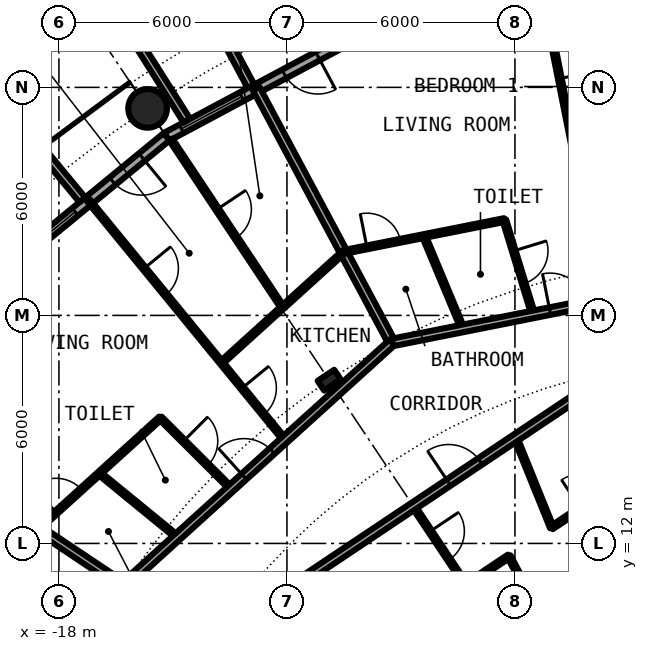
"""IFC4 building model, lengths in metres.
Left out: names, types, materials, properties, quantities, classifications, styles, units other than length and angle.
Written with IfcOpenShell. Run it as: python <this file> out.ifc"""

import sys

from ifc_helpers import new_model, si_unit, direction, frame, frame_2d, origin, origin_2d, place, context, subcontext, project, spatial, rectangle, hollow_circle, i_section, extrude, element, fill, save


model = new_model("IFC4")
c1 = context("Model", 3, precision=1e-05, world=origin(), true_north=direction((0.0, 1.0)))
c2 = subcontext(c1, "Body", "Model", "MODEL_VIEW")
j1 = project(units=[si_unit("LENGTHUNIT", "METRE"), si_unit("PLANEANGLEUNIT", "RADIAN")], contexts=[c1])
p1 = place(None, origin())
s1 = spatial("IfcSite", under=j1, at=p1, CompositionType="ELEMENT")
p2 = place(p1, origin())
s2 = spatial("IfcBuilding", under=s1, at=p2, CompositionType="ELEMENT")
p3 = place(p2, frame((0.0, 0.0, 63.6)))
s3 = spatial("IfcBuildingStorey", under=s2, at=p3, CompositionType="ELEMENT", Elevation=63.6)
p4 = place(p3, frame((-15.667, 23.448, 0.0), z_axis=(0.0, 0.0, 1.0), x_axis=(1.0, 0.0, 0.0)))
e1 = element("IfcColumn", 1, at=p4, inside=s3, PredefinedType="COLUMN", context=c2, shape_type="SweptSolid", body=[
    extrude(hollow_circle(Radius=0.508, WallThickness=0.04, at=origin_2d()), origin(), (0.0, 0.0, 1.0), 3.05),
])
p5 = place(p3, frame((-10.889, 16.297, 0.0), z_axis=(0.0, 0.0, 1.0), x_axis=(-0.55557023302, 0.831469612303, 0.0)))
e2 = element("IfcColumn", 2, at=p5, inside=s3, PredefinedType="COLUMN", context=c2, shape_type="SweptSolid", body=[
    extrude(i_section(OverallWidth=0.306, OverallDepth=0.524, WebThickness=0.021, FlangeThickness=0.04, FilletRadius=0.027, at=origin_2d()), origin(), (0.0, 0.0, 1.0), 3.05),
])
p6 = place(p3, frame((-10.447, 25.222, 0.0), z_axis=(0.0, 0.0, 1.0), x_axis=(-0.881915646801, -0.471407246368, 0.0)))
e3 = element("IfcWall", 3, at=p6, inside=s3, PredefinedType="SOLIDWALL", context=c2, shape_type="SweptSolid", body=[
    extrude(rectangle(XDim=5.352, YDim=0.25, at=frame_2d((2.676, 0.0))), origin(), (0.0, 0.0, 1.0), 2.7),
])
p7 = place(p6, frame((0.841, 0.0, 0.0)))
e4 = element("IfcOpeningElement", 4, at=p7, cuts=e3, PredefinedType="OPENING", context=c2, shape_type="SweptSolid", body=[
    extrude(rectangle(XDim=1.0, YDim=2.2, at=frame_2d((0.5, 1.1))), frame((0.0, 0.135, 0.0), z_axis=(0.0, -1.0, 0.0), x_axis=(1.0, 0.0, 0.0)), (0.0, 0.0, 1.0), 0.27),
])
p8 = place(p6, frame((3.111, 0.0, 0.3)))
e5 = element("IfcOpeningElement", 5, at=p8, cuts=e3, PredefinedType="OPENING", context=c2, shape_type="SweptSolid", body=[
    extrude(rectangle(XDim=1.8, YDim=2.1, at=frame_2d((0.9, 1.05))), frame((0.0, 0.135, 0.0), z_axis=(0.0, -1.0, 0.0), x_axis=(1.0, 0.0, 0.0)), (0.0, 0.0, 1.0), 0.27),
])
p9 = place(p3, frame((-12.945, 24.029, -0.03), z_axis=(0.0, 0.0, 1.0), x_axis=(-0.474424310775, 0.88029629861, 0.0)))
e6 = element("IfcWall", 6, at=p9, inside=s3, PredefinedType="SOLIDWALL", context=c2, shape_type="SweptSolid", body=[
    extrude(rectangle(XDim=3.006, YDim=0.2, at=frame_2d((1.503, 0.0))), origin(), (0.0, 0.0, 1.0), 2.73),
])
p10 = place(p3, frame((-14.635, 23.126, -0.03), z_axis=(0.0, 0.0, 1.0), x_axis=(-0.534437802731, 0.845207805816, 0.0)))
e7 = element("IfcWall", 7, at=p10, inside=s3, PredefinedType="SOLIDWALL", context=c2, shape_type="SweptSolid", body=[
    extrude(rectangle(XDim=2.932, YDim=0.2, at=frame_2d((1.466, 0.0))), origin(), (0.0, 0.0, 1.0), 2.73),
])
p11 = place(p3, frame((-15.167, 22.699, 0.0), z_axis=(0.0, 0.0, 1.0), x_axis=(-0.773019449054, -0.634382322723, 0.0)))
e8 = element("IfcWall", 8, at=p11, inside=s3, PredefinedType="SOLIDWALL", context=c2, shape_type="SweptSolid", body=[
    extrude(rectangle(XDim=5.352, YDim=0.25, at=frame_2d((2.676, 0.0))), origin(), (0.0, 0.0, 1.0), 2.7),
])
p12 = place(p11, frame((0.841, 0.0, 0.0)))
e9 = element("IfcOpeningElement", 9, at=p12, cuts=e8, PredefinedType="OPENING", context=c2, shape_type="SweptSolid", body=[
    extrude(rectangle(XDim=1.0, YDim=2.2, at=frame_2d((0.5, 1.1))), frame((0.0, 0.135, 0.0), z_axis=(0.0, -1.0, 0.0), x_axis=(1.0, 0.0, 0.0)), (0.0, 0.0, 1.0), 0.27),
])
p13 = place(p11, frame((3.111, 0.0, 0.3)))
e10 = element("IfcOpeningElement", 10, at=p13, cuts=e8, PredefinedType="OPENING", context=c2, shape_type="SweptSolid", body=[
    extrude(rectangle(XDim=1.8, YDim=2.1, at=frame_2d((0.9, 1.05))), frame((0.0, 0.135, 0.0), z_axis=(0.0, -1.0, 0.0), x_axis=(1.0, 0.0, 0.0)), (0.0, 0.0, 1.0), 0.27),
])
p14 = place(p3, frame((-17.384, 21.041, -0.03), z_axis=(0.0, 0.0, 1.0), x_axis=(-0.63709551667, 0.770784861449, 0.0)))
e11 = element("IfcWall", 11, at=p14, inside=s3, PredefinedType="SOLIDWALL", context=c2, shape_type="SweptSolid", body=[
    extrude(rectangle(XDim=3.006, YDim=0.2, at=frame_2d((1.503, 0.0))), origin(), (0.0, 0.0, 1.0), 2.73),
])
p15 = place(p3, frame((-22.595, 15.098, 0.0), z_axis=(0.0, 0.0, 1.0), x_axis=(0.831382022135, -0.555701298605, 0.0)))
e12 = element("IfcWall", 12, at=p15, inside=s3, PredefinedType="PARTITIONING", context=c2, shape_type="SweptSolid", body=[
    extrude(rectangle(XDim=7.313, YDim=0.2, at=frame_2d((3.657, 0.0))), origin(), (0.0, 0.0, 1.0), 2.7),
])
p16 = place(p3, frame((-17.219, 21.023, 0.0), z_axis=(0.0, 0.0, 1.0), x_axis=(0.633664062855, -0.773608334654, 0.0)))
e13 = element("IfcWall", 13, at=p16, inside=s3, PredefinedType="PARTITIONING", context=c2, shape_type="SweptSolid", body=[
    extrude(rectangle(XDim=8.138, YDim=0.1, at=frame_2d((4.069, 0.0))), origin(), (0.0, 0.0, 1.0), 2.7),
])
p17 = place(p16, frame((6.377, 0.0, 0.0)))
e14 = element("IfcOpeningElement", 14, at=p17, cuts=e13, PredefinedType="OPENING", context=c2, shape_type="SweptSolid", body=[
    extrude(rectangle(XDim=0.9, YDim=2.3, at=frame_2d((0.45, 1.15))), frame((0.0, 0.06, 0.0), z_axis=(0.0, -1.0, 0.0), x_axis=(1.0, 0.0, 0.0)), (0.0, 0.0, 1.0), 0.12),
])
p18 = place(p16, frame((2.308, 0.0, 0.0)))
e15 = element("IfcOpeningElement", 15, at=p18, cuts=e13, PredefinedType="OPENING", context=c2, shape_type="SweptSolid", body=[
    extrude(rectangle(XDim=0.9, YDim=2.3, at=frame_2d((0.45, 1.15))), frame((0.0, 0.06, 0.0), z_axis=(0.0, -1.0, 0.0), x_axis=(1.0, 0.0, 0.0)), (0.0, 0.0, 1.0), 0.12),
])
p19 = place(p3, frame((-16.936, 13.845, 0.0), z_axis=(0.0, 0.0, 1.0), x_axis=(0.774162545943, -0.632986850147, 0.0)))
e16 = element("IfcWall", 16, at=p19, inside=s3, PredefinedType="PARTITIONING", context=c2, shape_type="SweptSolid", body=[
    extrude(rectangle(XDim=2.649, YDim=0.1, at=frame_2d((1.325, 0.0))), origin(), (0.0, 0.0, 1.0), 2.7),
])
p20 = place(p3, frame((-15.33, 15.3, 0.0), z_axis=(0.0, 0.0, 1.0), x_axis=(0.707851299421, -0.706361478217, 0.0)))
e17 = element("IfcWall", 17, at=p20, inside=s3, PredefinedType="PARTITIONING", context=c2, shape_type="SweptSolid", body=[
    extrude(rectangle(XDim=2.622, YDim=0.1, at=frame_2d((1.311, 0.0))), origin(), (0.0, 0.0, 1.0), 2.7),
])
p21 = place(p20, frame((0.861, 0.0, 0.0)))
e18 = element("IfcOpeningElement", 18, at=p21, cuts=e17, PredefinedType="OPENING", context=c2, shape_type="SweptSolid", body=[
    extrude(rectangle(XDim=0.9, YDim=2.3, at=frame_2d((0.45, 1.15))), frame((0.0, 0.06, 0.0), z_axis=(0.0, -1.0, 0.0), x_axis=(1.0, 0.0, 0.0)), (0.0, 0.0, 1.0), 0.12),
])
p22 = place(p3, frame((-15.054, 22.624, 0.0), z_axis=(0.0, 0.0, 1.0), x_axis=(0.553913391217, -0.832574294, 0.0)))
e19 = element("IfcWall", 19, at=p22, inside=s3, PredefinedType="PARTITIONING", context=c2, shape_type="SweptSolid", body=[
    extrude(rectangle(XDim=5.301, YDim=0.1, at=frame_2d((2.65, 0.0))), origin(), (0.0, 0.0, 1.0), 2.7),
])
p23 = place(p22, frame((2.2, 0.0, 0.0)))
e20 = element("IfcOpeningElement", 20, at=p23, cuts=e19, PredefinedType="OPENING", context=c2, shape_type="SweptSolid", body=[
    extrude(rectangle(XDim=0.9, YDim=2.3, at=frame_2d((0.45, 1.15))), frame((0.0, 0.06, 0.0), z_axis=(0.0, -1.0, 0.0), x_axis=(1.0, 0.0, 0.0)), (0.0, 0.0, 1.0), 0.12),
])
p24 = place(p3, frame((-12.81, 23.966, 0.0), z_axis=(0.0, 0.0, 1.0), x_axis=(0.471439510802, -0.881898399848, 0.0)))
e21 = element("IfcWall", 21, at=p24, inside=s3, PredefinedType="PARTITIONING", context=c2, shape_type="SweptSolid", body=[
    extrude(rectangle(XDim=7.575, YDim=0.2, at=frame_2d((3.787, 0.0))), origin(), (0.0, 0.0, 1.0), 2.7),
])
p25 = place(p3, frame((-8.674, 12.982, 0.0), z_axis=(0.0, 0.0, 1.0), x_axis=(0.555355163998, -0.831613276602, 0.0)))
e22 = element("IfcWall", 22, at=p25, inside=s3, PredefinedType="PARTITIONING", context=c2, shape_type="SweptSolid", body=[
    extrude(rectangle(XDim=2.494, YDim=0.1, at=frame_2d((1.247, 0.0))), origin(), (0.0, 0.0, 1.0), 2.7),
])
p26 = place(p25, frame((0.797, 0.0, 0.0)))
e23 = element("IfcOpeningElement", 23, at=p26, cuts=e22, PredefinedType="OPENING", context=c2, shape_type="SweptSolid", body=[
    extrude(rectangle(XDim=0.9, YDim=2.3, at=frame_2d((0.45, 1.15))), frame((0.0, 0.06, 0.0), z_axis=(0.0, -1.0, 0.0), x_axis=(1.0, 0.0, 0.0)), (0.0, 0.0, 1.0), 0.12),
])
p27 = place(p3, frame((-8.396, 20.088, 0.0), z_axis=(0.0, 0.0, 1.0), x_axis=(0.385844829344, -0.922563693014, 0.0)))
e24 = element("IfcWall", 24, at=p27, inside=s3, PredefinedType="PARTITIONING", context=c2, shape_type="SweptSolid", body=[
    extrude(rectangle(XDim=2.636, YDim=0.1, at=frame_2d((1.318, 0.0))), origin(), (0.0, 0.0, 1.0), 2.7),
])
p28 = place(p3, frame((-6.159, 11.663, 0.0), z_axis=(0.0, 0.0, 1.0), x_axis=(0.466976820365, -0.884269556889, 0.0)))
e25 = element("IfcWall", 25, at=p28, inside=s3, PredefinedType="PARTITIONING", context=c2, shape_type="SweptSolid", body=[
    extrude(rectangle(XDim=5.469, YDim=0.1, at=frame_2d((2.735, 0.0))), origin(), (0.0, 0.0, 1.0), 2.7),
])
p29 = place(p28, frame((2.284, 0.0, 0.0)))
e26 = element("IfcOpeningElement", 26, at=p29, cuts=e25, PredefinedType="OPENING", context=c2, shape_type="SweptSolid", body=[
    extrude(rectangle(XDim=0.9, YDim=2.3, at=frame_2d((0.45, 1.15))), frame((0.0, 0.06, 0.0), z_axis=(0.0, -1.0, 0.0), x_axis=(1.0, 0.0, 0.0)), (0.0, 0.0, 1.0), 0.12),
])
p30 = place(p3, frame((-5.986, 14.779, 0.0), z_axis=(0.0, 0.0, 1.0), x_axis=(0.375649498413, -0.926761811008, 0.0)))
e27 = element("IfcWall", 27, at=p30, inside=s3, PredefinedType="PARTITIONING", context=c2, shape_type="SweptSolid", body=[
    extrude(rectangle(XDim=2.548, YDim=0.1, at=frame_2d((1.274, 0.0))), origin(), (0.0, 0.0, 1.0), 2.7),
])
p31 = place(p3, frame((-5.301, 26.653, 0.0), z_axis=(0.0, 0.0, 1.0), x_axis=(0.194986141751, -0.980805997395, 0.0)))
e28 = element("IfcWall", 28, at=p31, inside=s3, PredefinedType="PARTITIONING", context=c2, shape_type="SweptSolid", body=[
    extrude(rectangle(XDim=7.313, YDim=0.1, at=frame_2d((3.657, 0.0))), origin(), (0.0, 0.0, 1.0), 2.7),
])
p32 = place(p31, frame((5.985, 0.0, 0.0)))
e29 = element("IfcOpeningElement", 29, at=p32, cuts=e28, PredefinedType="OPENING", context=c2, shape_type="SweptSolid", body=[
    extrude(rectangle(XDim=0.9, YDim=2.3, at=frame_2d((0.45, 1.15))), frame((0.0, 0.06, 0.0), z_axis=(0.0, -1.0, 0.0), x_axis=(1.0, 0.0, 0.0)), (0.0, 0.0, 1.0), 0.12),
])
p33 = place(p31, frame((2.467, 0.0, 0.0)))
e30 = element("IfcOpeningElement", 30, at=p33, cuts=e28, PredefinedType="OPENING", context=c2, shape_type="SweptSolid", body=[
    extrude(rectangle(XDim=0.9, YDim=2.3, at=frame_2d((0.45, 1.15))), frame((0.0, 0.06, 0.0), z_axis=(0.0, -1.0, 0.0), x_axis=(1.0, 0.0, 0.0)), (0.0, 0.0, 1.0), 0.12),
])
p34 = place(p3, frame((-6.28, 20.509, 0.0), z_axis=(0.0, 0.0, 1.0), x_axis=(0.293008940941, -0.956109701095, 0.0)))
e31 = element("IfcWall", 31, at=p34, inside=s3, PredefinedType="PARTITIONING", context=c2, shape_type="SweptSolid", body=[
    extrude(rectangle(XDim=2.597, YDim=0.1, at=frame_2d((1.299, 0.0))), origin(), (0.0, 0.0, 1.0), 2.7),
])
p35 = place(p34, frame((0.849, 0.0, 0.0)))
e32 = element("IfcOpeningElement", 32, at=p35, cuts=e31, PredefinedType="OPENING", context=c2, shape_type="SweptSolid", body=[
    extrude(rectangle(XDim=0.9, YDim=2.3, at=frame_2d((0.45, 1.15))), frame((0.0, 0.06, 0.0), z_axis=(0.0, -1.0, 0.0), x_axis=(1.0, 0.0, 0.0)), (0.0, 0.0, 1.0), 0.12),
])
p36 = place(p3, frame((-9.695, 9.3, 0.0), z_axis=(0.0, 0.0, 1.0), x_axis=(0.831369521678, 0.555720000022, 0.0)))
e33 = element("IfcWall", 33, at=p36, inside=s3, PredefinedType="PARTITIONING", context=c2, shape_type="SweptSolid", body=[
    extrude(rectangle(XDim=4.252, YDim=0.1, at=frame_2d((2.126, 0.0))), origin(), (0.0, 0.0, 1.0), 2.7),
])
p37 = place(p3, frame((-5.032, 12.417, 0.0), z_axis=(0.0, 0.0, 1.0), x_axis=(0.831538390496, 0.555467285384, 0.0)))
e34 = element("IfcWall", 34, at=p37, inside=s3, PredefinedType="PARTITIONING", context=c2, shape_type="SweptSolid", body=[
    extrude(rectangle(XDim=2.717, YDim=0.1, at=frame_2d((1.358, 0.0))), origin(), (0.0, 0.0, 1.0), 2.7),
])
p38 = place(p37, frame((0.911, 0.0, 0.0)))
e35 = element("IfcOpeningElement", 35, at=p38, cuts=e34, PredefinedType="OPENING", context=c2, shape_type="SweptSolid", body=[
    extrude(rectangle(XDim=0.9, YDim=2.3, at=frame_2d((0.45, 1.15))), frame((0.0, 0.06, 0.0), z_axis=(0.0, -1.0, 0.0), x_axis=(1.0, 0.0, 0.0)), (0.0, 0.0, 1.0), 0.12),
])
p39 = place(p3, frame((-12.708, 10.286, 0.0), z_axis=(0.0, 0.0, 1.0), x_axis=(0.831405725802, 0.555665834026, 0.0)))
e36 = element("IfcWall", 36, at=p39, inside=s3, PredefinedType="PARTITIONING", context=c2, shape_type="SweptSolid", body=[
    extrude(rectangle(XDim=11.314, YDim=0.2, at=frame_2d((5.657, 0.0))), origin(), (0.0, 0.0, 1.0), 2.7),
])
p40 = place(p39, frame((5.969, 0.0, 0.0)))
e37 = element("IfcOpeningElement", 37, at=p40, cuts=e36, PredefinedType="OPENING", context=c2, shape_type="SweptSolid", body=[
    extrude(rectangle(XDim=1.0, YDim=2.3, at=frame_2d((0.5, 1.15))), frame((0.0, 0.11, 0.0), z_axis=(0.0, -1.0, 0.0), x_axis=(1.0, 0.0, 0.0)), (0.0, 0.0, 1.0), 0.22),
])
p41 = place(p3, frame((-9.239, 17.286, 0.0), z_axis=(0.0, 0.0, 1.0), x_axis=(0.98077905287, 0.195121627328, 0.0)))
e38 = element("IfcWall", 38, at=p41, inside=s3, PredefinedType="PARTITIONING", context=c2, shape_type="SweptSolid", body=[
    extrude(rectangle(XDim=11.379, YDim=0.2, at=frame_2d((5.689, 0.0))), origin(), (0.0, 0.0, 1.0), 2.38),
])
p42 = place(p41, frame((4.241, 0.0, 0.0)))
e39 = element("IfcOpeningElement", 39, at=p42, cuts=e38, PredefinedType="OPENING", context=c2, shape_type="SweptSolid", body=[
    extrude(rectangle(XDim=1.0, YDim=2.3, at=frame_2d((0.5, 1.15))), frame((0.0, 0.11, 0.0), z_axis=(0.0, -1.0, 0.0), x_axis=(1.0, 0.0, 0.0)), (0.0, 0.0, 1.0), 0.22),
])
p43 = place(p3, frame((-16.18, 10.995, 0.0), z_axis=(0.0, 0.0, 1.0), x_axis=(0.741086986457, 0.671409024741, 0.0)))
e40 = element("IfcWall", 40, at=p43, inside=s3, PredefinedType="PARTITIONING", context=c2, shape_type="SweptSolid", body=[
    extrude(rectangle(XDim=9.373, YDim=0.2, at=frame_2d((4.687, 0.0))), origin(), (0.0, 0.0, 1.0), 2.38),
])
p44 = place(p43, frame((4.115, 0.0, 0.0)))
e41 = element("IfcOpeningElement", 41, at=p44, cuts=e40, PredefinedType="OPENING", context=c2, shape_type="SweptSolid", body=[
    extrude(rectangle(XDim=1.0, YDim=2.3, at=frame_2d((0.5, 1.15))), frame((0.0, 0.11, 0.0), z_axis=(0.0, -1.0, 0.0), x_axis=(1.0, 0.0, 0.0)), (0.0, 0.0, 1.0), 0.22),
])
p45 = place(p3, frame((-10.511, 19.667, 0.0), z_axis=(0.0, 0.0, 1.0), x_axis=(0.980773878384, 0.195147635084, 0.0)))
e42 = element("IfcWall", 42, at=p45, inside=s3, PredefinedType="PARTITIONING", context=c2, shape_type="SweptSolid", body=[
    extrude(rectangle(XDim=4.315, YDim=0.1, at=frame_2d((2.157, 0.0))), origin(), (0.0, 0.0, 1.0), 2.7),
])
p46 = place(p45, frame((0.628, 0.0, 0.0)))
e43 = element("IfcOpeningElement", 43, at=p46, cuts=e42, PredefinedType="OPENING", context=c2, shape_type="SweptSolid", body=[
    extrude(rectangle(XDim=0.9, YDim=2.3, at=frame_2d((0.45, 1.15))), frame((0.0, 0.06, 0.0), z_axis=(0.0, -1.0, 0.0), x_axis=(1.0, 0.0, 0.0)), (0.0, 0.0, 1.0), 0.12),
])
p47 = place(p3, frame((-18.54, 12.392, 0.0), z_axis=(0.0, 0.0, 1.0), x_axis=(0.741109646243, 0.671384012504, 0.0)))
e44 = element("IfcWall", 44, at=p47, inside=s3, PredefinedType="PARTITIONING", context=c2, shape_type="SweptSolid", body=[
    extrude(rectangle(XDim=4.331, YDim=0.1, at=frame_2d((2.166, 0.0))), origin(), (0.0, 0.0, 1.0), 2.7),
])
p48 = place(p47, frame((0.629, 0.0, 0.0)))
e45 = element("IfcOpeningElement", 45, at=p48, cuts=e44, PredefinedType="OPENING", context=c2, shape_type="SweptSolid", body=[
    extrude(rectangle(XDim=0.9, YDim=2.3, at=frame_2d((0.45, 1.15))), frame((0.0, 0.06, 0.0), z_axis=(0.0, -1.0, 0.0), x_axis=(1.0, 0.0, 0.0)), (0.0, 0.0, 1.0), 0.12),
])
p49 = place(p3, frame((-13.724, 16.755, 0.0), z_axis=(0.0, 0.0, 1.0), x_axis=(0.741022791884, 0.671479874537, 0.0)))
e46 = element("IfcWall", 46, at=p49, inside=s3, PredefinedType="PARTITIONING", context=c2, shape_type="SweptSolid", body=[
    extrude(rectangle(XDim=4.343, YDim=0.1, at=frame_2d((2.171, 0.0))), origin(), (0.0, 0.0, 1.0), 2.7),
])
p50 = place(p7, origin())
e47 = element("IfcDoor", 47, at=p50, inside=s3, OperationType="SINGLE_SWING_LEFT", PredefinedType="DOOR", context=c2, shape_type="SweptSolid", body=[
    extrude(rectangle(XDim=1.0, YDim=2.2, at=frame_2d((0.5, 1.1))), frame((0.0, 0.025, 0.0), z_axis=(0.0, -1.0, 0.0), x_axis=(1.0, 0.0, 0.0)), (0.0, 0.0, 1.0), 0.05),
])
fill(e4, e47)
p51 = place(p8, origin())
e48 = element("IfcWindow", 48, at=p51, inside=s3, PartitioningType="SINGLE_PANEL", PredefinedType="WINDOW", context=c2, shape_type="SweptSolid", body=[
    extrude(rectangle(XDim=1.8, YDim=2.1, at=frame_2d((0.9, 1.05))), frame((0.0, 0.03, 0.0), z_axis=(0.0, -1.0, 0.0), x_axis=(1.0, 0.0, 0.0)), (0.0, 0.0, 1.0), 0.06),
])
fill(e5, e48)
p52 = place(p12, origin())
e49 = element("IfcDoor", 49, at=p52, inside=s3, OperationType="SINGLE_SWING_LEFT", PredefinedType="DOOR", context=c2, shape_type="SweptSolid", body=[
    extrude(rectangle(XDim=1.0, YDim=2.2, at=frame_2d((0.5, 1.1))), frame((0.0, 0.025, 0.0), z_axis=(0.0, -1.0, 0.0), x_axis=(1.0, 0.0, 0.0)), (0.0, 0.0, 1.0), 0.05),
])
fill(e9, e49)
p53 = place(p13, origin())
e50 = element("IfcWindow", 50, at=p53, inside=s3, PartitioningType="SINGLE_PANEL", PredefinedType="WINDOW", context=c2, shape_type="SweptSolid", body=[
    extrude(rectangle(XDim=1.8, YDim=2.1, at=frame_2d((0.9, 1.05))), frame((0.0, 0.03, 0.0), z_axis=(0.0, -1.0, 0.0), x_axis=(1.0, 0.0, 0.0)), (0.0, 0.0, 1.0), 0.06),
])
fill(e10, e50)
p54 = place(p42, origin())
e51 = element("IfcDoor", 51, at=p54, inside=s3, OperationType="SINGLE_SWING_LEFT", PredefinedType="DOOR", context=c2, shape_type="SweptSolid", body=[
    extrude(rectangle(XDim=1.0, YDim=2.3, at=frame_2d((0.5, 1.15))), frame((0.0, 0.025, 0.0), z_axis=(0.0, -1.0, 0.0), x_axis=(1.0, 0.0, 0.0)), (0.0, 0.0, 1.0), 0.05),
])
fill(e39, e51)
p55 = place(p46, origin())
e52 = element("IfcDoor", 52, at=p55, inside=s3, OperationType="SINGLE_SWING_LEFT", PredefinedType="DOOR", context=c2, shape_type="SweptSolid", body=[
    extrude(rectangle(XDim=0.9, YDim=2.3, at=frame_2d((0.45, 1.15))), frame((0.0, 0.025, 0.0), z_axis=(0.0, -1.0, 0.0), x_axis=(1.0, 0.0, 0.0)), (0.0, 0.0, 1.0), 0.05),
])
fill(e43, e52)
p56 = place(p35, origin())
e53 = element("IfcDoor", 53, at=p56, inside=s3, OperationType="SINGLE_SWING_LEFT", PredefinedType="DOOR", context=c2, shape_type="SweptSolid", body=[
    extrude(rectangle(XDim=0.9, YDim=2.3, at=frame_2d((0.45, 1.15))), frame((0.0, 0.025, 0.0), z_axis=(0.0, -1.0, 0.0), x_axis=(1.0, 0.0, 0.0)), (0.0, 0.0, 1.0), 0.05),
])
fill(e32, e53)
p57 = place(p33, origin())
e54 = element("IfcDoor", 54, at=p57, inside=s3, OperationType="SINGLE_SWING_LEFT", PredefinedType="DOOR", context=c2, shape_type="SweptSolid", body=[
    extrude(rectangle(XDim=0.9, YDim=2.3, at=frame_2d((0.45, 1.15))), frame((0.0, 0.025, 0.0), z_axis=(0.0, -1.0, 0.0), x_axis=(1.0, 0.0, 0.0)), (0.0, 0.0, 1.0), 0.05),
])
fill(e30, e54)
p58 = place(p44, origin())
e55 = element("IfcDoor", 55, at=p58, inside=s3, OperationType="SINGLE_SWING_LEFT", PredefinedType="DOOR", context=c2, shape_type="SweptSolid", body=[
    extrude(rectangle(XDim=1.0, YDim=2.3, at=frame_2d((0.5, 1.15))), frame((0.0, 0.025, 0.0), z_axis=(0.0, -1.0, 0.0), x_axis=(1.0, 0.0, 0.0)), (0.0, 0.0, 1.0), 0.05),
])
fill(e41, e55)
p59 = place(p48, origin())
e56 = element("IfcDoor", 56, at=p59, inside=s3, OperationType="SINGLE_SWING_LEFT", PredefinedType="DOOR", context=c2, shape_type="SweptSolid", body=[
    extrude(rectangle(XDim=0.9, YDim=2.3, at=frame_2d((0.45, 1.15))), frame((0.0, 0.025, 0.0), z_axis=(0.0, -1.0, 0.0), x_axis=(1.0, 0.0, 0.0)), (0.0, 0.0, 1.0), 0.05),
])
fill(e45, e56)
p60 = place(p21, origin())
e57 = element("IfcDoor", 57, at=p60, inside=s3, OperationType="SINGLE_SWING_RIGHT", PredefinedType="DOOR", context=c2, shape_type="SweptSolid", body=[
    extrude(rectangle(XDim=0.9, YDim=2.3, at=frame_2d((0.45, 1.15))), frame((0.0, 0.025, 0.0), z_axis=(0.0, -1.0, 0.0), x_axis=(1.0, 0.0, 0.0)), (0.0, 0.0, 1.0), 0.05),
])
fill(e18, e57)
p61 = place(p17, origin())
e58 = element("IfcDoor", 58, at=p61, inside=s3, OperationType="SINGLE_SWING_RIGHT", PredefinedType="DOOR", context=c2, shape_type="SweptSolid", body=[
    extrude(rectangle(XDim=0.9, YDim=2.3, at=frame_2d((0.45, 1.15))), frame((0.0, 0.025, 0.0), z_axis=(0.0, -1.0, 0.0), x_axis=(1.0, 0.0, 0.0)), (0.0, 0.0, 1.0), 0.05),
])
fill(e14, e58)
p62 = place(p18, origin())
e59 = element("IfcDoor", 59, at=p62, inside=s3, OperationType="SINGLE_SWING_LEFT", PredefinedType="DOOR", context=c2, shape_type="SweptSolid", body=[
    extrude(rectangle(XDim=0.9, YDim=2.3, at=frame_2d((0.45, 1.15))), frame((0.0, 0.025, 0.0), z_axis=(0.0, -1.0, 0.0), x_axis=(1.0, 0.0, 0.0)), (0.0, 0.0, 1.0), 0.05),
])
fill(e15, e59)
p63 = place(p23, origin())
e60 = element("IfcDoor", 60, at=p63, inside=s3, OperationType="SINGLE_SWING_LEFT", PredefinedType="DOOR", context=c2, shape_type="SweptSolid", body=[
    extrude(rectangle(XDim=0.9, YDim=2.3, at=frame_2d((0.45, 1.15))), frame((0.0, 0.025, 0.0), z_axis=(0.0, -1.0, 0.0), x_axis=(1.0, 0.0, 0.0)), (0.0, 0.0, 1.0), 0.05),
])
fill(e20, e60)
p64 = place(p40, origin())
e61 = element("IfcDoor", 61, at=p64, inside=s3, OperationType="SINGLE_SWING_RIGHT", PredefinedType="DOOR", context=c2, shape_type="SweptSolid", body=[
    extrude(rectangle(XDim=1.0, YDim=2.3, at=frame_2d((0.5, 1.15))), frame((0.0, 0.025, 0.0), z_axis=(0.0, -1.0, 0.0), x_axis=(1.0, 0.0, 0.0)), (0.0, 0.0, 1.0), 0.05),
])
fill(e37, e61)
p65 = place(p26, origin())
e62 = element("IfcDoor", 62, at=p65, inside=s3, OperationType="SINGLE_SWING_RIGHT", PredefinedType="DOOR", context=c2, shape_type="SweptSolid", body=[
    extrude(rectangle(XDim=0.9, YDim=2.3, at=frame_2d((0.45, 1.15))), frame((0.0, 0.025, 0.0), z_axis=(0.0, -1.0, 0.0), x_axis=(1.0, 0.0, 0.0)), (0.0, 0.0, 1.0), 0.05),
])
fill(e23, e62)
save(model, sys.argv[1])
